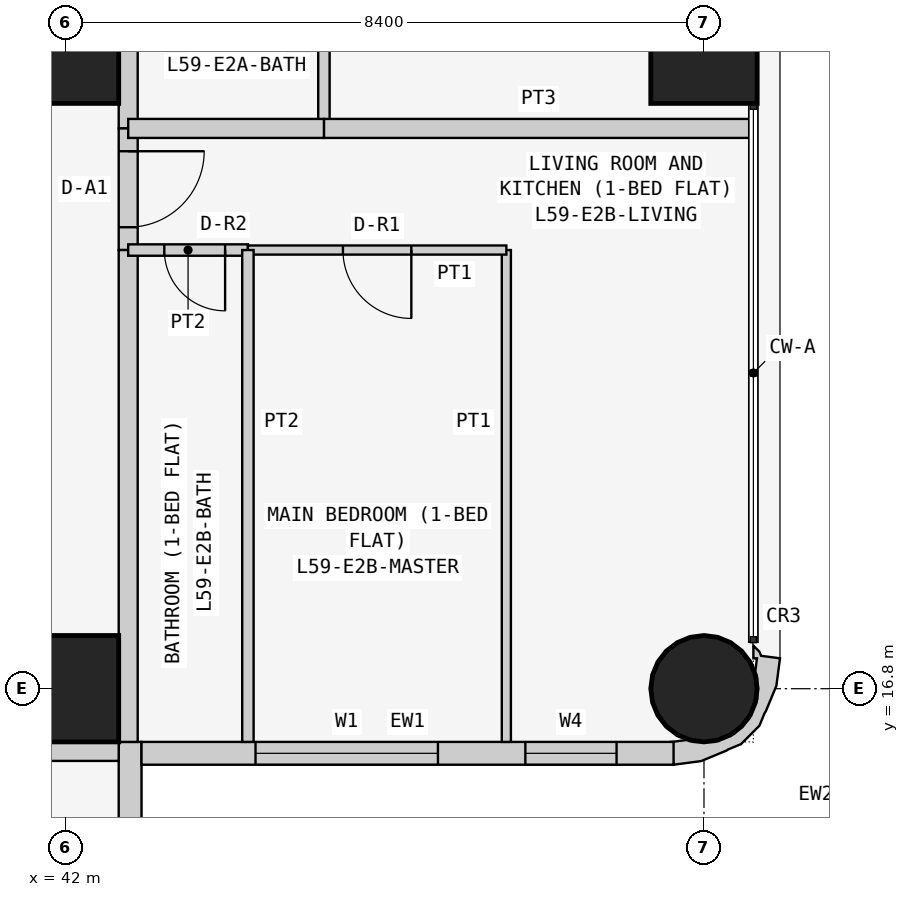
"""IFC4 building model, lengths in metres.
Left out: names, types, materials, properties, quantities, classifications, styles, units other than length and angle.
Written with IfcOpenShell. Run it as: python <this file> out.ifc"""

import sys

from ifc_helpers import new_model, si_unit, direction, frame, frame_2d, origin, origin_2d, place, context, subcontext, project, spatial, polyline, rectangle, circle, outline, extrude, element, fill, save


model = new_model("IFC4")
c1 = context("Model", 3, precision=1e-05, world=origin(), true_north=direction((0.0, 1.0)))
c2 = subcontext(c1, "Body", "Model", "MODEL_VIEW")
j1 = project(units=[si_unit("LENGTHUNIT", "METRE"), si_unit("PLANEANGLEUNIT", "RADIAN")], contexts=[c1])
p1 = place(None, origin())
s1 = spatial("IfcSite", under=j1, at=p1, CompositionType="ELEMENT")
p2 = place(p1, origin())
s2 = spatial("IfcBuilding", under=s1, at=p2, CompositionType="ELEMENT")
p3 = place(p2, frame((0.0, 0.0, 226.5)))
s3 = spatial("IfcBuildingStorey", under=s2, at=p3, CompositionType="ELEMENT", Elevation=226.5)
for number, where, z_axis, x_axis in (
    (1, (42.0, 16.8, 0.0), (0.0, 0.0, 1.0), (1.0, 0.0, 0.0)),
    (2, (42.0, 25.2, 0.0), (0.0, 0.0, 1.0), (1.0, 0.0, 0.0)),
):
    element("IfcColumn", number, at=place(p3, frame(where, z_axis=z_axis, x_axis=x_axis)), inside=s3, PredefinedType="COLUMN", context=c2, shape_type="SweptSolid", body=[
        extrude(rectangle(XDim=1.4, YDim=1.4, at=origin_2d()), origin(), (0.0, 0.0, 1.0), 3.6),
    ])
p4 = place(p3, frame((50.4, 16.8, 0.0), z_axis=(0.0, 0.0, 1.0), x_axis=(1.0, 0.0, 0.0)))
e3 = element("IfcColumn", 3, at=p4, inside=s3, PredefinedType="COLUMN", context=c2, shape_type="SweptSolid", body=[
    extrude(circle(Radius=0.7, at=origin_2d()), origin(), (0.0, 0.0, 1.0), 3.6),
])
p5 = place(p3, frame((50.4, 25.2, 0.0), z_axis=(0.0, 0.0, 1.0), x_axis=(1.0, 0.0, 0.0)))
e4 = element("IfcColumn", 4, at=p5, inside=s3, PredefinedType="COLUMN", context=c2, shape_type="SweptSolid", body=[
    extrude(rectangle(XDim=1.4, YDim=1.4, at=origin_2d()), origin(), (0.0, 0.0, 1.0), 3.6),
])
p6 = place(p3, frame((42.85, 8.8, 0.0), z_axis=(0.0, 0.0, 1.0), x_axis=(0.0, 1.0, 0.0)))
e5 = element("IfcWall", 5, at=p6, inside=s3, PredefinedType="SOLIDWALL", context=c2, shape_type="SweptSolid", body=[
    extrude(rectangle(XDim=7.3, YDim=0.3, at=frame_2d((3.65, 0.0))), origin(), (0.0, 0.0, 1.0), 3.45),
])
p7 = place(p6, frame((3.1, 0.0, 0.9)))
e6 = element("IfcOpeningElement", 6, at=p7, cuts=e5, PredefinedType="OPENING", context=c2, shape_type="SweptSolid", body=[
    extrude(rectangle(XDim=2.4, YDim=1.5, at=frame_2d((1.2, 0.75))), frame((0.0, 0.16, 0.0), z_axis=(0.0, -1.0, 0.0), x_axis=(1.0, 0.0, 0.0)), (0.0, 0.0, 1.0), 0.32),
])
p8 = place(p6, frame((0.75, 0.0, 0.9)))
e7 = element("IfcOpeningElement", 7, at=p8, cuts=e5, PredefinedType="OPENING", context=c2, shape_type="SweptSolid", body=[
    extrude(rectangle(XDim=1.2, YDim=1.5, at=frame_2d((0.6, 0.75))), frame((0.0, 0.16, 0.0), z_axis=(0.0, -1.0, 0.0), x_axis=(1.0, 0.0, 0.0)), (0.0, 0.0, 1.0), 0.32),
])
p9 = place(p3, frame((43.0, 15.95, 0.0), z_axis=(0.0, 0.0, 1.0), x_axis=(1.0, 0.0, 0.0)))
e8 = element("IfcWall", 8, at=p9, inside=s3, PredefinedType="SOLIDWALL", context=c2, shape_type="SweptSolid", body=[
    extrude(rectangle(XDim=7.0, YDim=0.3, at=frame_2d((3.5, 0.0))), origin(), (0.0, 0.0, 1.0), 3.45),
])
p10 = place(p9, frame((1.5, 0.0, 0.9)))
e9 = element("IfcOpeningElement", 9, at=p10, cuts=e8, PredefinedType="OPENING", context=c2, shape_type="SweptSolid", body=[
    extrude(rectangle(XDim=2.4, YDim=1.5, at=frame_2d((1.2, 0.75))), frame((0.0, 0.16, 0.0), z_axis=(0.0, -1.0, 0.0), x_axis=(1.0, 0.0, 0.0)), (0.0, 0.0, 1.0), 0.32),
])
p11 = place(p9, frame((5.05, 0.0, 0.9)))
e10 = element("IfcOpeningElement", 10, at=p11, cuts=e8, PredefinedType="OPENING", context=c2, shape_type="SweptSolid", body=[
    extrude(rectangle(XDim=1.2, YDim=1.5, at=frame_2d((0.6, 0.75))), frame((0.0, 0.16, 0.0), z_axis=(0.0, -1.0, 0.0), x_axis=(1.0, 0.0, 0.0)), (0.0, 0.0, 1.0), 0.32),
])
p12 = place(p3, frame((50.11, 16.076, 0.0), z_axis=(0.0, 0.0, 1.0), x_axis=(0.898030234854, -0.439933741929, 0.0)))
e11 = element("IfcWall", 11, at=p12, inside=s3, PredefinedType="SOLIDWALL", context=c2, shape_type="SweptSolid", body=[
    extrude(outline(polyline([(0.664, 1.577), (0.426, 1.497), (0.382, 1.536), (0.276, 1.572), (0.349, 1.423), (0.392, 1.444), (0.453, 1.261), (0.51, 1.211), (0.632, 0.961), (0.65, 0.683), (0.56, 0.419), (0.375, 0.21), (0.125, 0.087), (0.05, 0.082), (-0.128, -0.035), (-0.145, -0.044), (0.022, -0.296), (0.327, -0.094), (0.568, 0.18), (0.577, 0.199), (0.7, 0.337), (0.811, 0.661), (0.799, 0.846), (0.803, 0.866), (0.78, 1.231), (0.664, 1.577)])), origin(), (0.0, 0.0, 1.0), 3.45),
])
p13 = place(p3, frame((42.825, 26.8, 0.0), z_axis=(0.0, 0.0, 1.0), x_axis=(0.0, -1.0, 0.0)))
e12 = element("IfcWall", 12, at=p13, inside=s3, PredefinedType="PARTITIONING", context=c2, shape_type="SweptSolid", body=[
    extrude(rectangle(XDim=2.629, YDim=0.25, at=frame_2d((1.314, 0.0))), origin(), (0.0, 0.0, 1.0), 3.45),
])
p14 = place(p3, frame((42.825, 24.171, 0.0), z_axis=(0.0, 0.0, 1.0), x_axis=(0.0, -1.0, 0.0)))
e13 = element("IfcWall", 13, at=p14, inside=s3, PredefinedType="PARTITIONING", context=c2, shape_type="SweptSolid", body=[
    extrude(rectangle(XDim=1.6, YDim=0.25, at=frame_2d((0.8, 0.0))), origin(), (0.0, 0.0, 1.0), 3.45),
])
p15 = place(p14, frame((0.3, 0.0, 0.0)))
e14 = element("IfcOpeningElement", 14, at=p15, cuts=e13, PredefinedType="OPENING", context=c2, shape_type="SweptSolid", body=[
    extrude(rectangle(XDim=1.0, YDim=2.1, at=frame_2d((0.5, 1.05))), frame((0.0, 0.135, 0.0), z_axis=(0.0, -1.0, 0.0), x_axis=(1.0, 0.0, 0.0)), (0.0, 0.0, 1.0), 0.27),
])
p16 = place(p3, frame((42.825, 22.571, 0.0), z_axis=(0.0, 0.0, 1.0), x_axis=(0.0, -1.0, 0.0)))
e15 = element("IfcWall", 15, at=p16, inside=s3, PredefinedType="PARTITIONING", context=c2, shape_type="SweptSolid", body=[
    extrude(rectangle(XDim=6.471, YDim=0.25, at=frame_2d((3.235, 0.0))), origin(), (0.0, 0.0, 1.0), 3.45),
])
p17 = place(p3, frame((42.7, 15.975, 0.0), z_axis=(0.0, 0.0, 1.0), x_axis=(-1.0, 0.0, 0.0)))
e16 = element("IfcWall", 16, at=p17, inside=s3, PredefinedType="PARTITIONING", context=c2, shape_type="SweptSolid", body=[
    extrude(rectangle(XDim=6.871, YDim=0.25, at=frame_2d((3.436, 0.0))), origin(), (0.0, 0.0, 1.0), 3.45),
])
p18 = place(p3, frame((45.4, 24.171, 0.0), z_axis=(0.0, 0.0, 1.0), x_axis=(0.0, 1.0, 0.0)))
e17 = element("IfcWall", 17, at=p18, inside=s3, PredefinedType="PARTITIONING", context=c2, shape_type="SweptSolid", body=[
    extrude(rectangle(XDim=2.629, YDim=0.15, at=frame_2d((1.314, 0.0))), origin(), (0.0, 0.0, 1.0), 3.45),
])
p19 = place(p3, frame((51.05, 24.171, 0.0), z_axis=(0.0, 0.0, 1.0), x_axis=(-1.0, 0.0, 0.0)))
e18 = element("IfcWall", 18, at=p19, inside=s3, PredefinedType="PARTITIONING", context=c2, shape_type="SweptSolid", body=[
    extrude(rectangle(XDim=5.65, YDim=0.25, at=frame_2d((2.825, 0.0))), origin(), (0.0, 0.0, 1.0), 3.45),
])
p20 = place(p3, frame((45.4, 24.171, 0.0), z_axis=(0.0, 0.0, 1.0), x_axis=(-1.0, 0.0, 0.0)))
e19 = element("IfcWall", 19, at=p20, inside=s3, PredefinedType="PARTITIONING", context=c2, shape_type="SweptSolid", body=[
    extrude(rectangle(XDim=2.575, YDim=0.25, at=frame_2d((1.288, 0.0))), origin(), (0.0, 0.0, 1.0), 3.45),
])
p21 = place(p3, frame((44.4, 22.571, 0.0), z_axis=(0.0, 0.0, 1.0), x_axis=(-1.0, 0.0, 0.0)))
e20 = element("IfcWall", 20, at=p21, inside=s3, PredefinedType="PARTITIONING", context=c2, shape_type="SweptSolid", body=[
    extrude(rectangle(XDim=1.575, YDim=0.15, at=frame_2d((0.788, 0.0))), origin(), (0.0, 0.0, 1.0), 3.45),
])
p22 = place(p21, frame((0.3, 0.0, 0.0)))
e21 = element("IfcOpeningElement", 21, at=p22, cuts=e20, PredefinedType="OPENING", context=c2, shape_type="SweptSolid", body=[
    extrude(rectangle(XDim=0.8, YDim=2.1, at=frame_2d((0.4, 1.05))), frame((0.0, 0.085, 0.0), z_axis=(0.0, -1.0, 0.0), x_axis=(1.0, 0.0, 0.0)), (0.0, 0.0, 1.0), 0.17),
])
p23 = place(p3, frame((47.8, 16.1, 0.0), z_axis=(0.0, 0.0, 1.0), x_axis=(0.0, 1.0, 0.0)))
e22 = element("IfcWall", 22, at=p23, inside=s3, PredefinedType="PARTITIONING", context=c2, shape_type="SweptSolid", body=[
    extrude(rectangle(XDim=6.471, YDim=0.12, at=frame_2d((3.235, 0.0))), origin(), (0.0, 0.0, 1.0), 3.45),
])
p24 = place(p3, frame((47.8, 22.571, 0.0), z_axis=(0.0, 0.0, 1.0), x_axis=(-1.0, 0.0, 0.0)))
e23 = element("IfcWall", 23, at=p24, inside=s3, PredefinedType="PARTITIONING", context=c2, shape_type="SweptSolid", body=[
    extrude(rectangle(XDim=3.4, YDim=0.12, at=frame_2d((1.7, 0.0))), origin(), (0.0, 0.0, 1.0), 3.45),
])
p25 = place(p24, frame((1.25, 0.0, 0.0)))
e24 = element("IfcOpeningElement", 24, at=p25, cuts=e23, PredefinedType="OPENING", context=c2, shape_type="SweptSolid", body=[
    extrude(rectangle(XDim=0.9, YDim=2.1, at=frame_2d((0.45, 1.05))), frame((0.0, 0.07, 0.0), z_axis=(0.0, -1.0, 0.0), x_axis=(1.0, 0.0, 0.0)), (0.0, 0.0, 1.0), 0.14),
])
p26 = place(p3, frame((44.4, 22.571, 0.0), z_axis=(0.0, 0.0, 1.0), x_axis=(0.0, -1.0, 0.0)))
e25 = element("IfcWall", 25, at=p26, inside=s3, PredefinedType="PARTITIONING", context=c2, shape_type="SweptSolid", body=[
    extrude(rectangle(XDim=6.471, YDim=0.15, at=frame_2d((3.235, 0.0))), origin(), (0.0, 0.0, 1.0), 3.45),
])
p27 = place(p10, origin())
e26 = element("IfcWindow", 26, at=p27, inside=s3, PartitioningType="SINGLE_PANEL", PredefinedType="WINDOW", context=c2, shape_type="SweptSolid", body=[
    extrude(rectangle(XDim=2.4, YDim=1.5, at=frame_2d((1.2, 0.75))), frame((0.0, 0.03, 0.0), z_axis=(0.0, -1.0, 0.0), x_axis=(1.0, 0.0, 0.0)), (0.0, 0.0, 1.0), 0.06),
])
fill(e9, e26)
p28 = place(p11, origin())
e27 = element("IfcWindow", 27, at=p28, inside=s3, PartitioningType="SINGLE_PANEL", PredefinedType="WINDOW", context=c2, shape_type="SweptSolid", body=[
    extrude(rectangle(XDim=1.2, YDim=1.5, at=frame_2d((0.6, 0.75))), frame((0.0, 0.03, 0.0), z_axis=(0.0, -1.0, 0.0), x_axis=(1.0, 0.0, 0.0)), (0.0, 0.0, 1.0), 0.06),
])
fill(e10, e27)
p29 = place(p15, origin())
e28 = element("IfcDoor", 28, at=p29, inside=s3, OperationType="SINGLE_SWING_LEFT", PredefinedType="DOOR", context=c2, shape_type="SweptSolid", body=[
    extrude(rectangle(XDim=1.0, YDim=2.1, at=frame_2d((0.5, 1.05))), frame((0.0, 0.025, 0.0), z_axis=(0.0, -1.0, 0.0), x_axis=(1.0, 0.0, 0.0)), (0.0, 0.0, 1.0), 0.05),
])
fill(e14, e28)
p30 = place(p22, origin())
e29 = element("IfcDoor", 29, at=p30, inside=s3, OperationType="SINGLE_SWING_LEFT", PredefinedType="DOOR", context=c2, shape_type="SweptSolid", body=[
    extrude(rectangle(XDim=0.8, YDim=2.1, at=frame_2d((0.4, 1.05))), frame((0.0, 0.025, 0.0), z_axis=(0.0, -1.0, 0.0), x_axis=(1.0, 0.0, 0.0)), (0.0, 0.0, 1.0), 0.05),
])
fill(e21, e29)
p31 = place(p25, origin())
e30 = element("IfcDoor", 30, at=p31, inside=s3, OperationType="SINGLE_SWING_LEFT", PredefinedType="DOOR", context=c2, shape_type="SweptSolid", body=[
    extrude(rectangle(XDim=0.9, YDim=2.1, at=frame_2d((0.45, 1.05))), frame((0.0, 0.025, 0.0), z_axis=(0.0, -1.0, 0.0), x_axis=(1.0, 0.0, 0.0)), (0.0, 0.0, 1.0), 0.05),
])
fill(e24, e30)
save(model, sys.argv[1])
